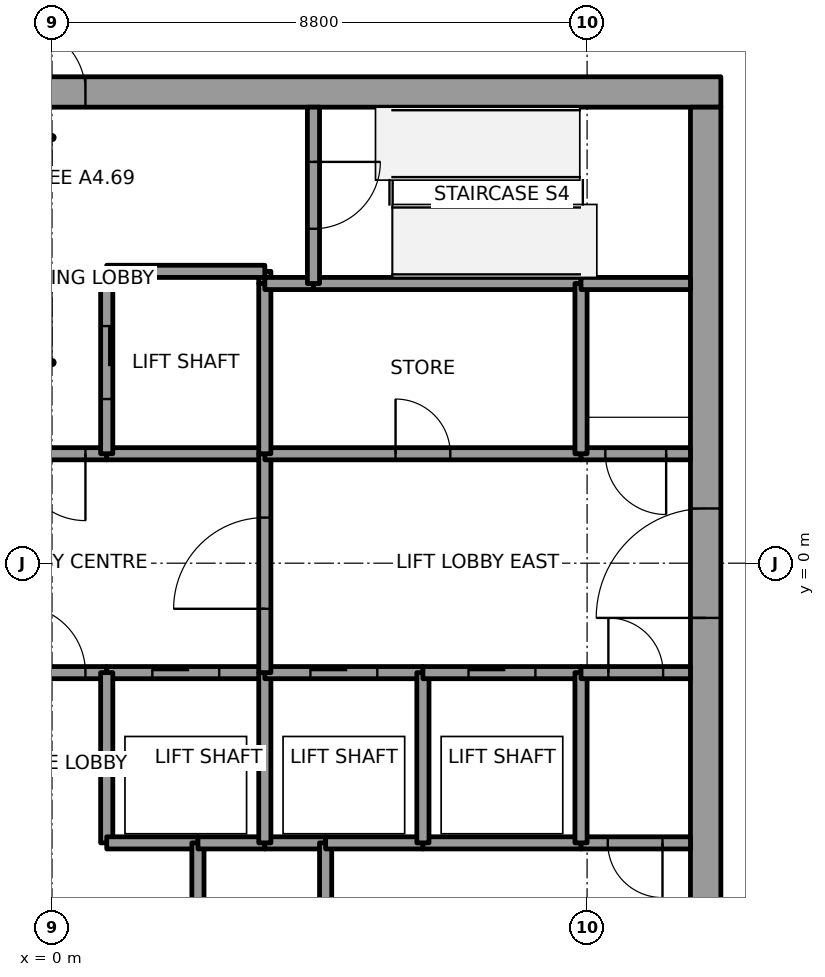
"""IFC4 building model, lengths in metres.
Left out: names, types, materials, properties, quantities, classifications, styles, units other than length and angle.
Written with IfcOpenShell. Run it as: python <this file> out.ifc"""

import sys

from ifc_helpers import new_model, si_unit, direction, frame, frame_2d, origin, place, context, subcontext, project, spatial, rectangle, extrude, element, fill, save


model = new_model("IFC4")
c1 = context("Model", 3, precision=1e-05, world=origin(), true_north=direction((0.0, 1.0)))
c2 = subcontext(c1, "Body", "Model", "MODEL_VIEW")
j1 = project(units=[si_unit("LENGTHUNIT", "METRE"), si_unit("PLANEANGLEUNIT", "RADIAN")], contexts=[c1])
p1 = place(None, origin())
s1 = spatial("IfcSite", under=j1, at=p1, CompositionType="ELEMENT")
p2 = place(p1, origin())
s2 = spatial("IfcBuilding", under=s1, at=p2, CompositionType="ELEMENT")
p3 = place(p2, frame((0.0, 0.0, 295.0)))
s3 = spatial("IfcBuildingStorey", under=s2, at=p3, CompositionType="ELEMENT", Elevation=295.0)
p4 = place(p3, frame((-11.0, 7.75, 0.0), z_axis=(0.0, 0.0, 1.0), x_axis=(1.0, 0.0, 0.0)))
e1 = element("IfcWall", 1, at=p4, inside=s3, PredefinedType="SHEAR", context=c2, shape_type="SweptSolid", body=[
    extrude(rectangle(XDim=22.0, YDim=0.5, at=frame_2d((11.0, 0.0))), origin(), (0.0, 0.0, 1.0), 4.0),
])
p5 = place(p4, frame((10.45, 0.0, 0.0)))
e2 = element("IfcOpeningElement", 2, at=p5, cuts=e1, PredefinedType="OPENING", context=c2, shape_type="SweptSolid", body=[
    extrude(rectangle(XDim=1.1, YDim=2.1, at=frame_2d((0.55, 1.05))), frame((0.0, 0.25, 0.0), z_axis=(0.0, -1.0, 0.0), x_axis=(1.0, 0.0, 0.0)), (0.0, 0.0, 1.0), 0.5),
])
p6 = place(p3, frame((10.75, -7.5, 0.0), z_axis=(0.0, 0.0, 1.0), x_axis=(0.0, 1.0, 0.0)))
e3 = element("IfcWall", 3, at=p6, inside=s3, PredefinedType="SHEAR", context=c2, shape_type="SweptSolid", body=[
    extrude(rectangle(XDim=15.0, YDim=0.5, at=frame_2d((7.5, 0.0))), origin(), (0.0, 0.0, 1.0), 4.0),
])
p7 = place(p6, frame((6.6, 0.0, 0.0)))
e4 = element("IfcOpeningElement", 4, at=p7, cuts=e3, PredefinedType="OPENING", context=c2, shape_type="SweptSolid", body=[
    extrude(rectangle(XDim=1.8, YDim=2.1, at=frame_2d((0.9, 1.05))), frame((0.0, 0.25, 0.0), z_axis=(0.0, -1.0, 0.0), x_axis=(1.0, 0.0, 0.0)), (0.0, 0.0, 1.0), 0.5),
])
p8 = place(p3, frame((-0.9, -1.8, 0.0), z_axis=(0.0, 0.0, 1.0), x_axis=(1.0, 0.0, 0.0)))
e5 = element("IfcWall", 5, at=p8, inside=s3, PredefinedType="SOLIDWALL", context=c2, shape_type="SweptSolid", body=[
    extrude(rectangle(XDim=1.8, YDim=0.2, at=frame_2d((0.9, 0.0))), origin(), (0.0, 0.0, 1.0), 3.85),
])
p9 = place(p8, frame((0.35, 0.0, 0.0)))
e6 = element("IfcOpeningElement", 6, at=p9, cuts=e5, PredefinedType="OPENING", context=c2, shape_type="SweptSolid", body=[
    extrude(rectangle(XDim=1.1, YDim=2.1, at=frame_2d((0.55, 1.05))), frame((0.0, 0.1, 0.0), z_axis=(0.0, -1.0, 0.0), x_axis=(1.0, 0.0, 0.0)), (0.0, 0.0, 1.0), 0.2),
])
p10 = place(p3, frame((0.9, 1.8, 0.0), z_axis=(0.0, 0.0, 1.0), x_axis=(-1.0, 0.0, 0.0)))
e7 = element("IfcWall", 7, at=p10, inside=s3, PredefinedType="SOLIDWALL", context=c2, shape_type="SweptSolid", body=[
    extrude(rectangle(XDim=1.8, YDim=0.2, at=frame_2d((0.9, 0.0))), origin(), (0.0, 0.0, 1.0), 3.85),
])
p11 = place(p10, frame((0.35, 0.0, 0.0)))
e8 = element("IfcOpeningElement", 8, at=p11, cuts=e7, PredefinedType="OPENING", context=c2, shape_type="SweptSolid", body=[
    extrude(rectangle(XDim=1.1, YDim=2.1, at=frame_2d((0.55, 1.05))), frame((0.0, 0.1, 0.0), z_axis=(0.0, -1.0, 0.0), x_axis=(1.0, 0.0, 0.0)), (0.0, 0.0, 1.0), 0.2),
])
p12 = place(p3, frame((0.9, -1.8, 0.0), z_axis=(0.0, 0.0, 1.0), x_axis=(1.0, 0.0, 0.0)))
e9 = element("IfcWall", 9, at=p12, inside=s3, PredefinedType="SOLIDWALL", context=c2, shape_type="SweptSolid", body=[
    extrude(rectangle(XDim=2.6, YDim=0.2, at=frame_2d((1.3, 0.0))), origin(), (0.0, 0.0, 1.0), 3.85),
])
p13 = place(p12, frame((0.75, 0.0, 0.0)))
e10 = element("IfcOpeningElement", 10, at=p13, cuts=e9, PredefinedType="OPENING", context=c2, shape_type="SweptSolid", body=[
    extrude(rectangle(XDim=1.1, YDim=2.1, at=frame_2d((0.55, 1.05))), frame((0.0, 0.1, 0.0), z_axis=(0.0, -1.0, 0.0), x_axis=(1.0, 0.0, 0.0)), (0.0, 0.0, 1.0), 0.2),
])
p14 = place(p3, frame((0.9, -1.8, 0.0), z_axis=(0.0, 0.0, 1.0), x_axis=(0.0, -1.0, 0.0)))
e11 = element("IfcWall", 11, at=p14, inside=s3, PredefinedType="SOLIDWALL", context=c2, shape_type="SweptSolid", body=[
    extrude(rectangle(XDim=2.8, YDim=0.2, at=frame_2d((1.4, 0.0))), origin(), (0.0, 0.0, 1.0), 3.85),
])
p15 = place(p3, frame((0.9, -4.6, 0.0), z_axis=(0.0, 0.0, 1.0), x_axis=(1.0, 0.0, 0.0)))
e12 = element("IfcWall", 12, at=p15, inside=s3, PredefinedType="SOLIDWALL", context=c2, shape_type="SweptSolid", body=[
    extrude(rectangle(XDim=1.5, YDim=0.2, at=frame_2d((0.75, 0.0))), origin(), (0.0, 0.0, 1.0), 3.85),
])
p16 = place(p3, frame((3.5, 1.8, 0.0), z_axis=(0.0, 0.0, 1.0), x_axis=(-1.0, 0.0, 0.0)))
e13 = element("IfcWall", 13, at=p16, inside=s3, PredefinedType="SOLIDWALL", context=c2, shape_type="SweptSolid", body=[
    extrude(rectangle(XDim=2.6, YDim=0.2, at=frame_2d((1.3, 0.0))), origin(), (0.0, 0.0, 1.0), 3.85),
])
p17 = place(p3, frame((3.5, 4.6, 0.0), z_axis=(0.0, 0.0, 1.0), x_axis=(0.0, 1.0, 0.0)))
e14 = element("IfcWall", 14, at=p17, inside=s3, PredefinedType="SOLIDWALL", context=c2, shape_type="SweptSolid", body=[
    extrude(rectangle(XDim=0.2, YDim=0.2, at=frame_2d((0.1, 0.0))), origin(), (0.0, 0.0, 1.0), 3.85),
])
p18 = place(p3, frame((3.5, 4.8, 0.0), z_axis=(0.0, 0.0, 1.0), x_axis=(-1.0, 0.0, 0.0)))
e15 = element("IfcWall", 15, at=p18, inside=s3, PredefinedType="SOLIDWALL", context=c2, shape_type="SweptSolid", body=[
    extrude(rectangle(XDim=2.6, YDim=0.2, at=frame_2d((1.3, 0.0))), origin(), (0.0, 0.0, 1.0), 3.85),
])
p19 = place(p3, frame((0.9, 4.8, 0.0), z_axis=(0.0, 0.0, 1.0), x_axis=(0.0, -1.0, 0.0)))
e16 = element("IfcWall", 16, at=p19, inside=s3, PredefinedType="SOLIDWALL", context=c2, shape_type="SweptSolid", body=[
    extrude(rectangle(XDim=3.0, YDim=0.2, at=frame_2d((1.5, 0.0))), origin(), (0.0, 0.0, 1.0), 3.85),
])
p20 = place(p19, frame((0.9, 0.0, 0.0)))
e17 = element("IfcOpeningElement", 17, at=p20, cuts=e16, PredefinedType="OPENING", context=c2, shape_type="SweptSolid", body=[
    extrude(rectangle(XDim=1.2, YDim=2.1, at=frame_2d((0.6, 1.05))), frame((0.0, 0.1, 0.0), z_axis=(0.0, -1.0, 0.0), x_axis=(1.0, 0.0, 0.0)), (0.0, 0.0, 1.0), 0.2),
])
p21 = place(p3, frame((2.4, -4.6, 0.0), z_axis=(0.0, 0.0, 1.0), x_axis=(0.0, -1.0, 0.0)))
e18 = element("IfcWall", 18, at=p21, inside=s3, PredefinedType="SOLIDWALL", context=c2, shape_type="SweptSolid", body=[
    extrude(rectangle(XDim=2.9, YDim=0.2, at=frame_2d((1.45, 0.0))), origin(), (0.0, 0.0, 1.0), 3.85),
])
p22 = place(p21, frame((1.0, 0.0, 0.0)))
e19 = element("IfcOpeningElement", 19, at=p22, cuts=e18, PredefinedType="OPENING", context=c2, shape_type="SweptSolid", body=[
    extrude(rectangle(XDim=0.9, YDim=2.1, at=frame_2d((0.45, 1.05))), frame((0.0, 0.1, 0.0), z_axis=(0.0, -1.0, 0.0), x_axis=(1.0, 0.0, 0.0)), (0.0, 0.0, 1.0), 0.2),
])
p23 = place(p3, frame((3.5, -4.6, 0.0), z_axis=(0.0, 0.0, 1.0), x_axis=(-1.0, 0.0, 0.0)))
e20 = element("IfcWall", 20, at=p23, inside=s3, PredefinedType="SOLIDWALL", context=c2, shape_type="SweptSolid", body=[
    extrude(rectangle(XDim=1.1, YDim=0.2, at=frame_2d((0.55, 0.0))), origin(), (0.0, 0.0, 1.0), 3.85),
])
p24 = place(p3, frame((4.5, -4.6, 0.0), z_axis=(0.0, 0.0, 1.0), x_axis=(-1.0, 0.0, 0.0)))
e21 = element("IfcWall", 21, at=p24, inside=s3, PredefinedType="SOLIDWALL", context=c2, shape_type="SweptSolid", body=[
    extrude(rectangle(XDim=1.0, YDim=0.2, at=frame_2d((0.5, 0.0))), origin(), (0.0, 0.0, 1.0), 3.85),
])
p25 = place(p3, frame((3.5, -4.6, 0.0), z_axis=(0.0, 0.0, 1.0), x_axis=(0.0, 1.0, 0.0)))
e22 = element("IfcWall", 22, at=p25, inside=s3, PredefinedType="SOLIDWALL", context=c2, shape_type="SweptSolid", body=[
    extrude(rectangle(XDim=2.8, YDim=0.2, at=frame_2d((1.4, 0.0))), origin(), (0.0, 0.0, 1.0), 3.85),
])
p26 = place(p3, frame((3.5, -1.8, 0.0), z_axis=(0.0, 0.0, 1.0), x_axis=(1.0, 0.0, 0.0)))
e23 = element("IfcWall", 23, at=p26, inside=s3, PredefinedType="SOLIDWALL", context=c2, shape_type="SweptSolid", body=[
    extrude(rectangle(XDim=2.6, YDim=0.2, at=frame_2d((1.3, 0.0))), origin(), (0.0, 0.0, 1.0), 3.85),
])
p27 = place(p26, frame((0.75, 0.0, 0.0)))
e24 = element("IfcOpeningElement", 24, at=p27, cuts=e23, PredefinedType="OPENING", context=c2, shape_type="SweptSolid", body=[
    extrude(rectangle(XDim=1.1, YDim=2.1, at=frame_2d((0.55, 1.05))), frame((0.0, 0.1, 0.0), z_axis=(0.0, -1.0, 0.0), x_axis=(1.0, 0.0, 0.0)), (0.0, 0.0, 1.0), 0.2),
])
p28 = place(p3, frame((3.5, -1.8, 0.0), z_axis=(0.0, 0.0, 1.0), x_axis=(0.0, 1.0, 0.0)))
e25 = element("IfcWall", 25, at=p28, inside=s3, PredefinedType="SOLIDWALL", context=c2, shape_type="SweptSolid", body=[
    extrude(rectangle(XDim=3.6, YDim=0.2, at=frame_2d((1.8, 0.0))), origin(), (0.0, 0.0, 1.0), 3.85),
])
p29 = place(p28, frame((1.05, 0.0, 0.0)))
e26 = element("IfcOpeningElement", 26, at=p29, cuts=e25, PredefinedType="OPENING", context=c2, shape_type="SweptSolid", body=[
    extrude(rectangle(XDim=1.5, YDim=2.1, at=frame_2d((0.75, 1.05))), frame((0.0, 0.1, 0.0), z_axis=(0.0, -1.0, 0.0), x_axis=(1.0, 0.0, 0.0)), (0.0, 0.0, 1.0), 0.2),
])
p30 = place(p3, frame((3.5, 1.8, 0.0), z_axis=(0.0, 0.0, 1.0), x_axis=(1.0, 0.0, 0.0)))
e27 = element("IfcWall", 27, at=p30, inside=s3, PredefinedType="SOLIDWALL", context=c2, shape_type="SweptSolid", body=[
    extrude(rectangle(XDim=5.2, YDim=0.2, at=frame_2d((2.6, 0.0))), origin(), (0.0, 0.0, 1.0), 3.85),
])
p31 = place(p30, frame((2.15, 0.0, 0.0)))
e28 = element("IfcOpeningElement", 28, at=p31, cuts=e27, PredefinedType="OPENING", context=c2, shape_type="SweptSolid", body=[
    extrude(rectangle(XDim=0.9, YDim=2.1, at=frame_2d((0.45, 1.05))), frame((0.0, 0.1, 0.0), z_axis=(0.0, -1.0, 0.0), x_axis=(1.0, 0.0, 0.0)), (0.0, 0.0, 1.0), 0.2),
])
p32 = place(p3, frame((3.5, 4.6, 0.0), z_axis=(0.0, 0.0, 1.0), x_axis=(0.0, -1.0, 0.0)))
e29 = element("IfcWall", 29, at=p32, inside=s3, PredefinedType="SOLIDWALL", context=c2, shape_type="SweptSolid", body=[
    extrude(rectangle(XDim=2.8, YDim=0.2, at=frame_2d((1.4, 0.0))), origin(), (0.0, 0.0, 1.0), 3.85),
])
p33 = place(p3, frame((4.3, 4.6, 0.0), z_axis=(0.0, 0.0, 1.0), x_axis=(-1.0, 0.0, 0.0)))
e30 = element("IfcWall", 30, at=p33, inside=s3, PredefinedType="SOLIDWALL", context=c2, shape_type="SweptSolid", body=[
    extrude(rectangle(XDim=0.8, YDim=0.2, at=frame_2d((0.4, 0.0))), origin(), (0.0, 0.0, 1.0), 3.85),
])
p34 = place(p3, frame((8.7, 4.6, 0.0), z_axis=(0.0, 0.0, 1.0), x_axis=(-1.0, 0.0, 0.0)))
e31 = element("IfcWall", 31, at=p34, inside=s3, PredefinedType="SOLIDWALL", context=c2, shape_type="SweptSolid", body=[
    extrude(rectangle(XDim=4.4, YDim=0.2, at=frame_2d((2.2, 0.0))), origin(), (0.0, 0.0, 1.0), 3.85),
])
p35 = place(p3, frame((4.3, 7.5, 0.0), z_axis=(0.0, 0.0, 1.0), x_axis=(0.0, -1.0, 0.0)))
e32 = element("IfcWall", 32, at=p35, inside=s3, PredefinedType="SOLIDWALL", context=c2, shape_type="SweptSolid", body=[
    extrude(rectangle(XDim=2.9, YDim=0.2, at=frame_2d((1.45, 0.0))), origin(), (0.0, 0.0, 1.0), 3.85),
])
p36 = place(p35, frame((0.9, 0.0, 0.0)))
e33 = element("IfcOpeningElement", 33, at=p36, cuts=e32, PredefinedType="OPENING", context=c2, shape_type="SweptSolid", body=[
    extrude(rectangle(XDim=1.1, YDim=2.1, at=frame_2d((0.55, 1.05))), frame((0.0, 0.1, 0.0), z_axis=(0.0, -1.0, 0.0), x_axis=(1.0, 0.0, 0.0)), (0.0, 0.0, 1.0), 0.2),
])
p37 = place(p3, frame((4.5, -4.6, 0.0), z_axis=(0.0, 0.0, 1.0), x_axis=(0.0, -1.0, 0.0)))
e34 = element("IfcWall", 34, at=p37, inside=s3, PredefinedType="SOLIDWALL", context=c2, shape_type="SweptSolid", body=[
    extrude(rectangle(XDim=2.9, YDim=0.2, at=frame_2d((1.45, 0.0))), origin(), (0.0, 0.0, 1.0), 3.85),
])
p38 = place(p3, frame((6.1, -4.6, 0.0), z_axis=(0.0, 0.0, 1.0), x_axis=(-1.0, 0.0, 0.0)))
e35 = element("IfcWall", 35, at=p38, inside=s3, PredefinedType="SOLIDWALL", context=c2, shape_type="SweptSolid", body=[
    extrude(rectangle(XDim=1.6, YDim=0.2, at=frame_2d((0.8, 0.0))), origin(), (0.0, 0.0, 1.0), 3.85),
])
p39 = place(p3, frame((8.7, -4.6, 0.0), z_axis=(0.0, 0.0, 1.0), x_axis=(-1.0, 0.0, 0.0)))
e36 = element("IfcWall", 36, at=p39, inside=s3, PredefinedType="SOLIDWALL", context=c2, shape_type="SweptSolid", body=[
    extrude(rectangle(XDim=2.6, YDim=0.2, at=frame_2d((1.3, 0.0))), origin(), (0.0, 0.0, 1.0), 3.85),
])
p40 = place(p3, frame((6.1, -4.6, 0.0), z_axis=(0.0, 0.0, 1.0), x_axis=(0.0, 1.0, 0.0)))
e37 = element("IfcWall", 37, at=p40, inside=s3, PredefinedType="SOLIDWALL", context=c2, shape_type="SweptSolid", body=[
    extrude(rectangle(XDim=2.8, YDim=0.2, at=frame_2d((1.4, 0.0))), origin(), (0.0, 0.0, 1.0), 3.85),
])
p41 = place(p3, frame((6.1, -1.8, 0.0), z_axis=(0.0, 0.0, 1.0), x_axis=(1.0, 0.0, 0.0)))
e38 = element("IfcWall", 38, at=p41, inside=s3, PredefinedType="SOLIDWALL", context=c2, shape_type="SweptSolid", body=[
    extrude(rectangle(XDim=2.6, YDim=0.2, at=frame_2d((1.3, 0.0))), origin(), (0.0, 0.0, 1.0), 3.85),
])
p42 = place(p41, frame((0.75, 0.0, 0.0)))
e39 = element("IfcOpeningElement", 39, at=p42, cuts=e38, PredefinedType="OPENING", context=c2, shape_type="SweptSolid", body=[
    extrude(rectangle(XDim=1.1, YDim=2.1, at=frame_2d((0.55, 1.05))), frame((0.0, 0.1, 0.0), z_axis=(0.0, -1.0, 0.0), x_axis=(1.0, 0.0, 0.0)), (0.0, 0.0, 1.0), 0.2),
])
p43 = place(p3, frame((10.5, -4.6, 0.0), z_axis=(0.0, 0.0, 1.0), x_axis=(-1.0, 0.0, 0.0)))
e40 = element("IfcWall", 40, at=p43, inside=s3, PredefinedType="SOLIDWALL", context=c2, shape_type="SweptSolid", body=[
    extrude(rectangle(XDim=1.8, YDim=0.2, at=frame_2d((0.9, 0.0))), origin(), (0.0, 0.0, 1.0), 3.85),
])
p44 = place(p43, frame((0.46, 0.0, 0.0)))
e41 = element("IfcOpeningElement", 41, at=p44, cuts=e40, PredefinedType="OPENING", context=c2, shape_type="SweptSolid", body=[
    extrude(rectangle(XDim=0.9, YDim=2.1, at=frame_2d((0.45, 1.05))), frame((0.0, 0.1, 0.0), z_axis=(0.0, -1.0, 0.0), x_axis=(1.0, 0.0, 0.0)), (0.0, 0.0, 1.0), 0.2),
])
p45 = place(p3, frame((8.7, -1.8, 0.0), z_axis=(0.0, 0.0, 1.0), x_axis=(0.0, -1.0, 0.0)))
e42 = element("IfcWall", 42, at=p45, inside=s3, PredefinedType="SOLIDWALL", context=c2, shape_type="SweptSolid", body=[
    extrude(rectangle(XDim=2.8, YDim=0.2, at=frame_2d((1.4, 0.0))), origin(), (0.0, 0.0, 1.0), 3.85),
])
p46 = place(p3, frame((8.7, -1.8, 0.0), z_axis=(0.0, 0.0, 1.0), x_axis=(1.0, 0.0, 0.0)))
e43 = element("IfcWall", 43, at=p46, inside=s3, PredefinedType="SOLIDWALL", context=c2, shape_type="SweptSolid", body=[
    extrude(rectangle(XDim=1.8, YDim=0.2, at=frame_2d((0.9, 0.0))), origin(), (0.0, 0.0, 1.0), 3.85),
])
p47 = place(p46, frame((0.45, 0.0, 0.0)))
e44 = element("IfcOpeningElement", 44, at=p47, cuts=e43, PredefinedType="OPENING", context=c2, shape_type="SweptSolid", body=[
    extrude(rectangle(XDim=0.9, YDim=2.1, at=frame_2d((0.45, 1.05))), frame((0.0, 0.1, 0.0), z_axis=(0.0, -1.0, 0.0), x_axis=(1.0, 0.0, 0.0)), (0.0, 0.0, 1.0), 0.2),
])
p48 = place(p3, frame((10.5, 1.8, 0.0), z_axis=(0.0, 0.0, 1.0), x_axis=(-1.0, 0.0, 0.0)))
e45 = element("IfcWall", 45, at=p48, inside=s3, PredefinedType="SOLIDWALL", context=c2, shape_type="SweptSolid", body=[
    extrude(rectangle(XDim=1.8, YDim=0.2, at=frame_2d((0.9, 0.0))), origin(), (0.0, 0.0, 1.0), 3.85),
])
p49 = place(p48, frame((0.4, 0.0, 0.0)))
e46 = element("IfcOpeningElement", 46, at=p49, cuts=e45, PredefinedType="OPENING", context=c2, shape_type="SweptSolid", body=[
    extrude(rectangle(XDim=1.0, YDim=2.1, at=frame_2d((0.5, 1.05))), frame((0.0, 0.1, 0.0), z_axis=(0.0, -1.0, 0.0), x_axis=(1.0, 0.0, 0.0)), (0.0, 0.0, 1.0), 0.2),
])
p50 = place(p3, frame((8.7, 1.8, 0.0), z_axis=(0.0, 0.0, 1.0), x_axis=(0.0, 1.0, 0.0)))
e47 = element("IfcWall", 47, at=p50, inside=s3, PredefinedType="SOLIDWALL", context=c2, shape_type="SweptSolid", body=[
    extrude(rectangle(XDim=2.8, YDim=0.2, at=frame_2d((1.4, 0.0))), origin(), (0.0, 0.0, 1.0), 3.85),
])
p51 = place(p3, frame((10.5, 4.6, 0.0), z_axis=(0.0, 0.0, 1.0), x_axis=(-1.0, 0.0, 0.0)))
e48 = element("IfcWall", 48, at=p51, inside=s3, PredefinedType="SOLIDWALL", context=c2, shape_type="SweptSolid", body=[
    extrude(rectangle(XDim=1.8, YDim=0.2, at=frame_2d((0.9, 0.0))), origin(), (0.0, 0.0, 1.0), 3.85),
])
p52 = place(p13, origin())
e49 = element("IfcDoor", 49, at=p52, inside=s3, OperationType="SLIDING_TO_LEFT", PredefinedType="DOOR", context=c2, shape_type="SweptSolid", body=[
    extrude(rectangle(XDim=1.1, YDim=2.1, at=frame_2d((0.55, 1.05))), frame((0.0, 0.025, 0.0), z_axis=(0.0, -1.0, 0.0), x_axis=(1.0, 0.0, 0.0)), (0.0, 0.0, 1.0), 0.05),
])
fill(e10, e49)
p53 = place(p27, origin())
e50 = element("IfcDoor", 50, at=p53, inside=s3, OperationType="SLIDING_TO_LEFT", PredefinedType="DOOR", context=c2, shape_type="SweptSolid", body=[
    extrude(rectangle(XDim=1.1, YDim=2.1, at=frame_2d((0.55, 1.05))), frame((0.0, 0.025, 0.0), z_axis=(0.0, -1.0, 0.0), x_axis=(1.0, 0.0, 0.0)), (0.0, 0.0, 1.0), 0.05),
])
fill(e24, e50)
p54 = place(p42, origin())
e51 = element("IfcDoor", 51, at=p54, inside=s3, OperationType="SLIDING_TO_LEFT", PredefinedType="DOOR", context=c2, shape_type="SweptSolid", body=[
    extrude(rectangle(XDim=1.1, YDim=2.1, at=frame_2d((0.55, 1.05))), frame((0.0, 0.025, 0.0), z_axis=(0.0, -1.0, 0.0), x_axis=(1.0, 0.0, 0.0)), (0.0, 0.0, 1.0), 0.05),
])
fill(e39, e51)
p55 = place(p20, origin())
e52 = element("IfcDoor", 52, at=p55, inside=s3, OperationType="SLIDING_TO_RIGHT", PredefinedType="DOOR", context=c2, shape_type="SweptSolid", body=[
    extrude(rectangle(XDim=1.2, YDim=2.1, at=frame_2d((0.6, 1.05))), frame((0.0, 0.025, 0.0), z_axis=(0.0, -1.0, 0.0), x_axis=(1.0, 0.0, 0.0)), (0.0, 0.0, 1.0), 0.05),
])
fill(e17, e52)
p56 = place(p29, origin())
e53 = element("IfcDoor", 53, at=p56, inside=s3, OperationType="DOUBLE_DOOR_SINGLE_SWING", PredefinedType="DOOR", context=c2, shape_type="SweptSolid", body=[
    extrude(rectangle(XDim=1.5, YDim=2.1, at=frame_2d((0.75, 1.05))), frame((0.0, 0.025, 0.0), z_axis=(0.0, -1.0, 0.0), x_axis=(1.0, 0.0, 0.0)), (0.0, 0.0, 1.0), 0.05),
])
fill(e26, e53)
p57 = place(p11, origin())
e54 = element("IfcDoor", 54, at=p57, inside=s3, OperationType="SINGLE_SWING_RIGHT", PredefinedType="DOOR", context=c2, shape_type="SweptSolid", body=[
    extrude(rectangle(XDim=1.1, YDim=2.1, at=frame_2d((0.55, 1.05))), frame((0.0, 0.025, 0.0), z_axis=(0.0, -1.0, 0.0), x_axis=(1.0, 0.0, 0.0)), (0.0, 0.0, 1.0), 0.05),
])
fill(e8, e54)
p58 = place(p9, origin())
e55 = element("IfcDoor", 55, at=p58, inside=s3, OperationType="SINGLE_SWING_RIGHT", PredefinedType="DOOR", context=c2, shape_type="SweptSolid", body=[
    extrude(rectangle(XDim=1.1, YDim=2.1, at=frame_2d((0.55, 1.05))), frame((0.0, 0.025, 0.0), z_axis=(0.0, -1.0, 0.0), x_axis=(1.0, 0.0, 0.0)), (0.0, 0.0, 1.0), 0.05),
])
fill(e6, e55)
p59 = place(p49, origin())
e56 = element("IfcDoor", 56, at=p59, inside=s3, OperationType="SINGLE_SWING_RIGHT", PredefinedType="DOOR", context=c2, shape_type="SweptSolid", body=[
    extrude(rectangle(XDim=1.0, YDim=2.1, at=frame_2d((0.5, 1.05))), frame((0.0, 0.025, 0.0), z_axis=(0.0, -1.0, 0.0), x_axis=(1.0, 0.0, 0.0)), (0.0, 0.0, 1.0), 0.05),
])
fill(e46, e56)
p60 = place(p36, origin())
e57 = element("IfcDoor", 57, at=p60, inside=s3, OperationType="SINGLE_SWING_LEFT", PredefinedType="DOOR", context=c2, shape_type="SweptSolid", body=[
    extrude(rectangle(XDim=1.1, YDim=2.1, at=frame_2d((0.55, 1.05))), frame((0.0, 0.025, 0.0), z_axis=(0.0, -1.0, 0.0), x_axis=(1.0, 0.0, 0.0)), (0.0, 0.0, 1.0), 0.05),
])
fill(e33, e57)
p61 = place(p31, origin())
e58 = element("IfcDoor", 58, at=p61, inside=s3, OperationType="SINGLE_SWING_LEFT", PredefinedType="DOOR", context=c2, shape_type="SweptSolid", body=[
    extrude(rectangle(XDim=0.9, YDim=2.1, at=frame_2d((0.45, 1.05))), frame((0.0, 0.025, 0.0), z_axis=(0.0, -1.0, 0.0), x_axis=(1.0, 0.0, 0.0)), (0.0, 0.0, 1.0), 0.05),
])
fill(e28, e58)
p62 = place(p44, origin())
e59 = element("IfcDoor", 59, at=p62, inside=s3, OperationType="SINGLE_SWING_LEFT", PredefinedType="DOOR", context=c2, shape_type="SweptSolid", body=[
    extrude(rectangle(XDim=0.9, YDim=2.1, at=frame_2d((0.45, 1.05))), frame((0.0, 0.025, 0.0), z_axis=(0.0, -1.0, 0.0), x_axis=(1.0, 0.0, 0.0)), (0.0, 0.0, 1.0), 0.05),
])
fill(e41, e59)
p63 = place(p47, origin())
e60 = element("IfcDoor", 60, at=p63, inside=s3, OperationType="SINGLE_SWING_LEFT", PredefinedType="DOOR", context=c2, shape_type="SweptSolid", body=[
    extrude(rectangle(XDim=0.9, YDim=2.1, at=frame_2d((0.45, 1.05))), frame((0.0, 0.025, 0.0), z_axis=(0.0, -1.0, 0.0), x_axis=(1.0, 0.0, 0.0)), (0.0, 0.0, 1.0), 0.05),
])
fill(e44, e60)
p64 = place(p7, origin())
e61 = element("IfcDoor", 61, at=p64, inside=s3, OperationType="DOUBLE_DOOR_SINGLE_SWING", PredefinedType="DOOR", context=c2, shape_type="SweptSolid", body=[
    extrude(rectangle(XDim=1.8, YDim=2.1, at=frame_2d((0.9, 1.05))), frame((0.0, 0.025, 0.0), z_axis=(0.0, -1.0, 0.0), x_axis=(1.0, 0.0, 0.0)), (0.0, 0.0, 1.0), 0.05),
])
fill(e4, e61)
p65 = place(p5, origin())
e62 = element("IfcDoor", 62, at=p65, inside=s3, OperationType="SINGLE_SWING_RIGHT", PredefinedType="DOOR", context=c2, shape_type="SweptSolid", body=[
    extrude(rectangle(XDim=1.1, YDim=2.1, at=frame_2d((0.55, 1.05))), frame((0.0, 0.025, 0.0), z_axis=(0.0, -1.0, 0.0), x_axis=(1.0, 0.0, 0.0)), (0.0, 0.0, 1.0), 0.05),
])
fill(e2, e62)
save(model, sys.argv[1])
